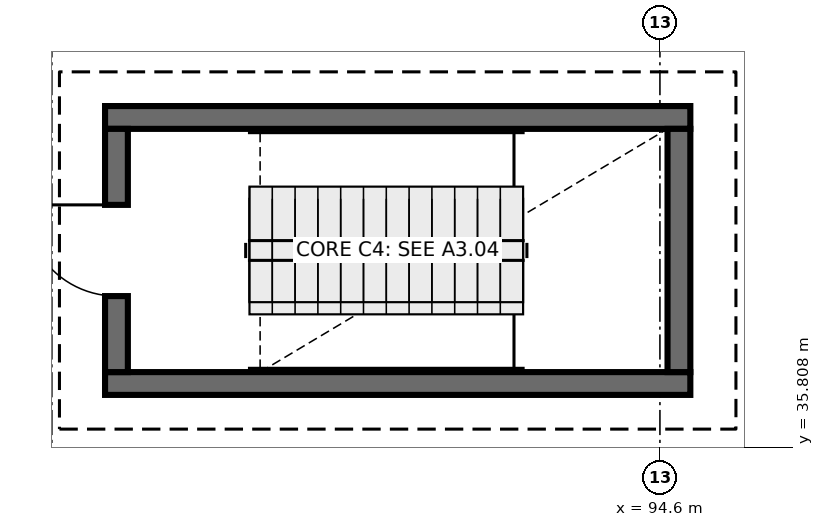
"""IFC4 building model, lengths in metres.
Left out: names, types, materials, properties, quantities, classifications, styles, units other than length and angle.
Written with IfcOpenShell. Run it as: python <this file> out.ifc"""

import sys

from ifc_helpers import new_model, si_unit, direction, frame, frame_2d, origin, place, context, subcontext, project, spatial, rectangle, extrude, element, fill, save


model = new_model("IFC4")
c1 = context("Model", 3, precision=1e-05, world=origin(), true_north=direction((0.0, 1.0)))
c2 = subcontext(c1, "Body", "Model", "MODEL_VIEW")
j1 = project(units=[si_unit("LENGTHUNIT", "METRE"), si_unit("PLANEANGLEUNIT", "RADIAN")], contexts=[c1])
p1 = place(None, origin())
s1 = spatial("IfcSite", under=j1, at=p1, CompositionType="ELEMENT")
p2 = place(p1, origin())
s2 = spatial("IfcBuilding", under=s1, at=p2, CompositionType="ELEMENT")
p3 = place(p2, origin())
s3 = spatial("IfcBuildingStorey", under=s2, at=p3, CompositionType="ELEMENT", Elevation=0.0)
for number, where, z_axis, x_axis in (
    (1, (87.3, 36.65, 0.0), (0.0, 0.0, 1.0), (1.0, 0.0, 0.0)),
    (2, (95.0, 40.15, 0.0), (0.0, 0.0, 1.0), (-1.0, 0.0, 0.0)),
):
    element("IfcWall", number, at=place(p3, frame(where, z_axis=z_axis, x_axis=x_axis)), inside=s3, PredefinedType="SHEAR", context=c2, shape_type="SweptSolid", body=[
        extrude(rectangle(XDim=7.7, YDim=0.3, at=frame_2d((3.85, 0.0))), origin(), (0.0, 0.0, 1.0), 4.8),
    ])
p4 = place(p3, frame((87.45, 40.0, 0.0), z_axis=(0.0, 0.0, 1.0), x_axis=(0.0, -1.0, 0.0)))
e3 = element("IfcWall", 3, at=p4, inside=s3, PredefinedType="SHEAR", context=c2, shape_type="SweptSolid", body=[
    extrude(rectangle(XDim=3.2, YDim=0.3, at=frame_2d((1.6, 0.0))), origin(), (0.0, 0.0, 1.0), 4.8),
])
p5 = place(p4, frame((1.0, 0.0, 0.0)))
e4 = element("IfcOpeningElement", 4, at=p5, cuts=e3, PredefinedType="OPENING", context=c2, shape_type="SweptSolid", body=[
    extrude(rectangle(XDim=1.2, YDim=2.15, at=frame_2d((0.6, 1.075))), frame((0.0, 0.16, 0.0), z_axis=(0.0, -1.0, 0.0), x_axis=(1.0, 0.0, 0.0)), (0.0, 0.0, 1.0), 0.32),
])
p6 = place(p3, frame((94.85, 36.8, 0.0), z_axis=(0.0, 0.0, 1.0), x_axis=(0.0, 1.0, 0.0)))
e5 = element("IfcWall", 5, at=p6, inside=s3, PredefinedType="SHEAR", context=c2, shape_type="SweptSolid", body=[
    extrude(rectangle(XDim=3.2, YDim=0.3, at=frame_2d((1.6, 0.0))), origin(), (0.0, 0.0, 1.0), 4.8),
])
p7 = place(p5, frame((1.2, 0.0, 0.0), z_axis=(0.0, 0.0, 1.0), x_axis=(-1.0, 0.0, 0.0)))
e6 = element("IfcDoor", 6, at=p7, inside=s3, OperationType="SINGLE_SWING_LEFT", PredefinedType="DOOR", context=c2, shape_type="SweptSolid", body=[
    extrude(rectangle(XDim=1.2, YDim=2.15, at=frame_2d((0.6, 1.075))), frame((0.0, 0.025, 0.0), z_axis=(0.0, -1.0, 0.0), x_axis=(1.0, 0.0, 0.0)), (0.0, 0.0, 1.0), 0.05),
])
fill(e4, e6)
save(model, sys.argv[1])
